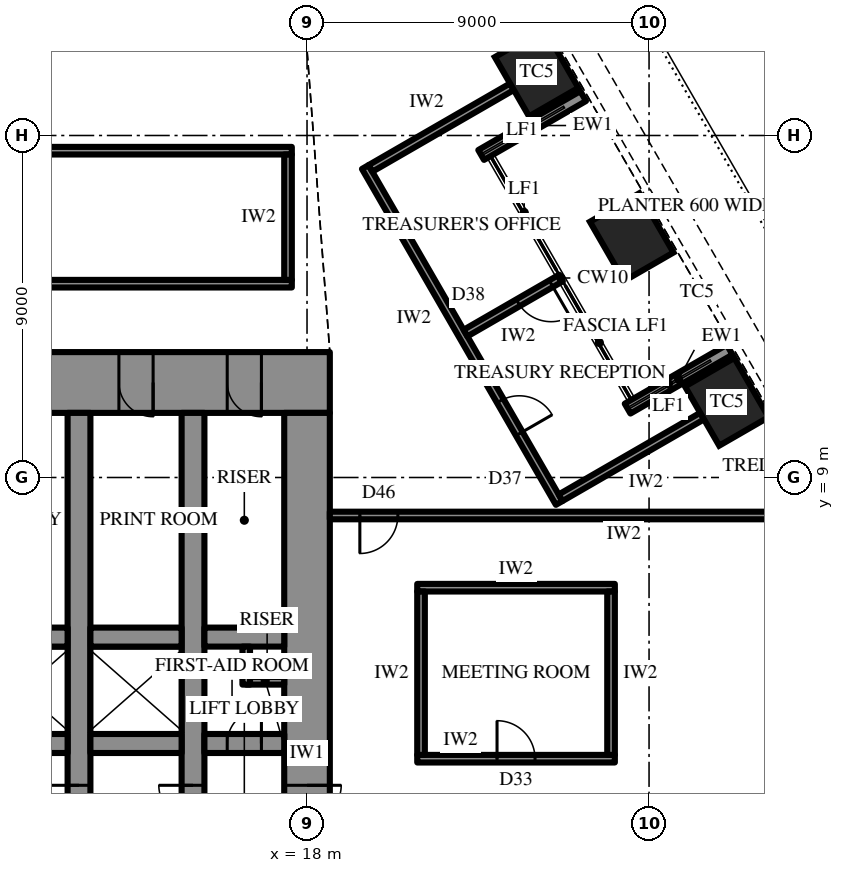
"""IFC4 building model, lengths in metres.
Left out: names, types, materials, properties, quantities, classifications, styles, units other than length and angle.
Written with IfcOpenShell. Run it as: python <this file> out.ifc"""

import sys

from ifc_helpers import new_model, si_unit, direction, frame, frame_2d, origin, origin_2d, place, context, subcontext, project, spatial, rectangle, extrude, element, fill, save


model = new_model("IFC4")
c1 = context("Model", 3, precision=1e-05, world=origin(), true_north=direction((0.0, 1.0)))
c2 = subcontext(c1, "Body", "Model", "MODEL_VIEW")
j1 = project(units=[si_unit("LENGTHUNIT", "METRE"), si_unit("PLANEANGLEUNIT", "RADIAN")], contexts=[c1])
p1 = place(None, origin())
s1 = spatial("IfcSite", under=j1, at=p1, CompositionType="ELEMENT")
p2 = place(p1, origin())
s2 = spatial("IfcBuilding", under=s1, at=p2, CompositionType="ELEMENT")
p3 = place(p2, frame((0.0, 0.0, 136.3)))
s3 = spatial("IfcBuildingStorey", under=s2, at=p3, CompositionType="ELEMENT", Elevation=136.3)
for number, where, z_axis, x_axis in (
    (1, (29.045, 10.992, 0.0), (0.0, 0.0, 1.0), (-0.5, 0.866, 0.0)),
    (2, (26.544, 15.325, 0.0), (0.0, 0.0, 1.0), (-0.5, 0.866, 0.0)),
    (3, (24.042, 19.658, 0.0), (0.0, 0.0, 1.0), (-0.5, 0.866, 0.0)),
):
    element("IfcColumn", number, at=place(p3, frame(where, z_axis=z_axis, x_axis=x_axis)), inside=s3, PredefinedType="COLUMN", context=c2, shape_type="SweptSolid", body=[
        extrude(rectangle(XDim=1.8, YDim=1.5, at=origin_2d()), origin(), (0.0, 0.0, 1.0), 4.2),
    ])
p4 = place(p3, frame((-18.6, 11.5, 0.0), z_axis=(0.0, 0.0, 1.0), x_axis=(1.0, 0.0, 0.0)))
e4 = element("IfcWall", 4, at=p4, inside=s3, PredefinedType="SHEAR", context=c2, shape_type="SweptSolid", body=[
    extrude(rectangle(XDim=37.2, YDim=1.6, at=frame_2d((18.6, 0.0))), origin(), (0.0, 0.0, 1.0), 4.2),
])
p5 = place(p4, frame((19.45, 0.0, 0.0)))
e5 = element("IfcOpeningElement", 5, at=p5, cuts=e4, PredefinedType="OPENING", context=c2, shape_type="SweptSolid", body=[
    extrude(rectangle(XDim=0.9, YDim=2.2, at=frame_2d((0.45, 1.1))), frame((0.0, 0.81, 0.0), z_axis=(0.0, -1.0, 0.0), x_axis=(1.0, 0.0, 0.0)), (0.0, 0.0, 1.0), 1.62),
])
p6 = place(p4, frame((22.45, 0.0, 0.0)))
e6 = element("IfcOpeningElement", 6, at=p6, cuts=e4, PredefinedType="OPENING", context=c2, shape_type="SweptSolid", body=[
    extrude(rectangle(XDim=0.9, YDim=2.2, at=frame_2d((0.45, 1.1))), frame((0.0, 0.81, 0.0), z_axis=(0.0, -1.0, 0.0), x_axis=(1.0, 0.0, 0.0)), (0.0, 0.0, 1.0), 1.62),
])
p7 = place(p4, frame((25.5, 0.0, 0.0)))
e7 = element("IfcOpeningElement", 7, at=p7, cuts=e4, PredefinedType="OPENING", context=c2, shape_type="SweptSolid", body=[
    extrude(rectangle(XDim=1.0, YDim=2.2, at=frame_2d((0.5, 1.1))), frame((0.0, 0.81, 0.0), z_axis=(0.0, -1.0, 0.0), x_axis=(1.0, 0.0, 0.0)), (0.0, 0.0, 1.0), 1.62),
])
p8 = place(p4, frame((1.8, 0.0, 0.0)))
e8 = element("IfcOpeningElement", 8, at=p8, cuts=e4, PredefinedType="OPENING", context=c2, shape_type="SweptSolid", body=[
    extrude(rectangle(XDim=0.9, YDim=2.2, at=frame_2d((0.45, 1.1))), frame((0.0, 0.81, 0.0), z_axis=(0.0, -1.0, 0.0), x_axis=(1.0, 0.0, 0.0)), (0.0, 0.0, 1.0), 1.62),
])
p9 = place(p4, frame((4.65, 0.0, 0.0)))
e9 = element("IfcOpeningElement", 9, at=p9, cuts=e4, PredefinedType="OPENING", context=c2, shape_type="SweptSolid", body=[
    extrude(rectangle(XDim=0.9, YDim=2.2, at=frame_2d((0.45, 1.1))), frame((0.0, 0.81, 0.0), z_axis=(0.0, -1.0, 0.0), x_axis=(1.0, 0.0, 0.0)), (0.0, 0.0, 1.0), 1.62),
])
p10 = place(p4, frame((7.75, 0.0, 0.0)))
e10 = element("IfcOpeningElement", 10, at=p10, cuts=e4, PredefinedType="OPENING", context=c2, shape_type="SweptSolid", body=[
    extrude(rectangle(XDim=0.9, YDim=2.2, at=frame_2d((0.45, 1.1))), frame((0.0, 0.81, 0.0), z_axis=(0.0, -1.0, 0.0), x_axis=(1.0, 0.0, 0.0)), (0.0, 0.0, 1.0), 1.62),
])
p11 = place(p4, frame((28.55, 0.0, 0.0)))
e11 = element("IfcOpeningElement", 11, at=p11, cuts=e4, PredefinedType="OPENING", context=c2, shape_type="SweptSolid", body=[
    extrude(rectangle(XDim=0.9, YDim=2.2, at=frame_2d((0.45, 1.1))), frame((0.0, 0.81, 0.0), z_axis=(0.0, -1.0, 0.0), x_axis=(1.0, 0.0, 0.0)), (0.0, 0.0, 1.0), 1.62),
])
p12 = place(p4, frame((31.65, 0.0, 0.0)))
e12 = element("IfcOpeningElement", 12, at=p12, cuts=e4, PredefinedType="OPENING", context=c2, shape_type="SweptSolid", body=[
    extrude(rectangle(XDim=0.9, YDim=2.2, at=frame_2d((0.45, 1.1))), frame((0.0, 0.81, 0.0), z_axis=(0.0, -1.0, 0.0), x_axis=(1.0, 0.0, 0.0)), (0.0, 0.0, 1.0), 1.62),
])
p13 = place(p4, frame((34.5, 0.0, 0.0)))
e13 = element("IfcOpeningElement", 13, at=p13, cuts=e4, PredefinedType="OPENING", context=c2, shape_type="SweptSolid", body=[
    extrude(rectangle(XDim=0.9, YDim=2.2, at=frame_2d((0.45, 1.1))), frame((0.0, 0.81, 0.0), z_axis=(0.0, -1.0, 0.0), x_axis=(1.0, 0.0, 0.0)), (0.0, 0.0, 1.0), 1.62),
])
p14 = place(p3, frame((18.0, -10.7, 0.0), z_axis=(0.0, 0.0, 1.0), x_axis=(0.0, 1.0, 0.0)))
e14 = element("IfcWall", 14, at=p14, inside=s3, PredefinedType="SHEAR", context=c2, shape_type="SweptSolid", body=[
    extrude(rectangle(XDim=21.4, YDim=1.2, at=frame_2d((10.7, 0.0))), origin(), (0.0, 0.0, 1.0), 4.2),
])
p15 = place(p14, frame((9.8, 0.0, 0.0)))
e15 = element("IfcOpeningElement", 15, at=p15, cuts=e14, PredefinedType="OPENING", context=c2, shape_type="SweptSolid", body=[
    extrude(rectangle(XDim=1.8, YDim=2.4, at=frame_2d((0.9, 1.2))), frame((0.0, 0.61, 0.0), z_axis=(0.0, -1.0, 0.0), x_axis=(1.0, 0.0, 0.0)), (0.0, 0.0, 1.0), 1.22),
])
p16 = place(p3, frame((12.0, -10.7, 0.0), z_axis=(0.0, 0.0, 1.0), x_axis=(0.0, 1.0, 0.0)))
e16 = element("IfcWall", 16, at=p16, inside=s3, PredefinedType="SHEAR", context=c2, shape_type="SweptSolid", body=[
    extrude(rectangle(XDim=21.4, YDim=0.6, at=frame_2d((10.7, 0.0))), origin(), (0.0, 0.0, 1.0), 4.2),
])
p17 = place(p16, frame((9.8, 0.0, 0.0)))
e17 = element("IfcOpeningElement", 17, at=p17, cuts=e16, PredefinedType="OPENING", context=c2, shape_type="SweptSolid", body=[
    extrude(rectangle(XDim=1.8, YDim=2.4, at=frame_2d((0.9, 1.2))), frame((0.0, 0.31, 0.0), z_axis=(0.0, -1.0, 0.0), x_axis=(1.0, 0.0, 0.0)), (0.0, 0.0, 1.0), 0.62),
])
p18 = place(p3, frame((15.0, -10.7, 0.0), z_axis=(0.0, 0.0, 1.0), x_axis=(0.0, 1.0, 0.0)))
e18 = element("IfcWall", 18, at=p18, inside=s3, PredefinedType="SHEAR", context=c2, shape_type="SweptSolid", body=[
    extrude(rectangle(XDim=21.4, YDim=0.6, at=frame_2d((10.7, 0.0))), origin(), (0.0, 0.0, 1.0), 4.2),
])
p19 = place(p18, frame((9.8, 0.0, 0.0)))
e19 = element("IfcOpeningElement", 19, at=p19, cuts=e18, PredefinedType="OPENING", context=c2, shape_type="SweptSolid", body=[
    extrude(rectangle(XDim=1.8, YDim=2.4, at=frame_2d((0.9, 1.2))), frame((0.0, 0.31, 0.0), z_axis=(0.0, -1.0, 0.0), x_axis=(1.0, 0.0, 0.0)), (0.0, 0.0, 1.0), 0.62),
])
p20 = place(p3, frame((-3.2, 2.0, 0.0), z_axis=(0.0, 0.0, 1.0), x_axis=(1.0, 0.0, 0.0)))
e20 = element("IfcWall", 20, at=p20, inside=s3, PredefinedType="SHEAR", context=c2, shape_type="SweptSolid", body=[
    extrude(rectangle(XDim=14.9, YDim=0.5, at=frame_2d((7.45, 0.0))), origin(), (0.0, 0.0, 1.0), 4.2),
])
p21 = place(p20, frame((1.15, 0.0, 0.0)))
e21 = element("IfcOpeningElement", 21, at=p21, cuts=e20, PredefinedType="OPENING", context=c2, shape_type="SweptSolid", body=[
    extrude(rectangle(XDim=1.1, YDim=2.2, at=frame_2d((0.55, 1.1))), frame((0.0, 0.26, 0.0), z_axis=(0.0, -1.0, 0.0), x_axis=(1.0, 0.0, 0.0)), (0.0, 0.0, 1.0), 0.52),
])
p22 = place(p20, frame((4.15, 0.0, 0.0)))
e22 = element("IfcOpeningElement", 22, at=p22, cuts=e20, PredefinedType="OPENING", context=c2, shape_type="SweptSolid", body=[
    extrude(rectangle(XDim=1.1, YDim=2.2, at=frame_2d((0.55, 1.1))), frame((0.0, 0.26, 0.0), z_axis=(0.0, -1.0, 0.0), x_axis=(1.0, 0.0, 0.0)), (0.0, 0.0, 1.0), 0.52),
])
p23 = place(p20, frame((7.15, 0.0, 0.0)))
e23 = element("IfcOpeningElement", 23, at=p23, cuts=e20, PredefinedType="OPENING", context=c2, shape_type="SweptSolid", body=[
    extrude(rectangle(XDim=1.1, YDim=2.2, at=frame_2d((0.55, 1.1))), frame((0.0, 0.26, 0.0), z_axis=(0.0, -1.0, 0.0), x_axis=(1.0, 0.0, 0.0)), (0.0, 0.0, 1.0), 0.52),
])
p24 = place(p20, frame((10.15, 0.0, 0.0)))
e24 = element("IfcOpeningElement", 24, at=p24, cuts=e20, PredefinedType="OPENING", context=c2, shape_type="SweptSolid", body=[
    extrude(rectangle(XDim=1.1, YDim=2.2, at=frame_2d((0.55, 1.1))), frame((0.0, 0.26, 0.0), z_axis=(0.0, -1.0, 0.0), x_axis=(1.0, 0.0, 0.0)), (0.0, 0.0, 1.0), 0.52),
])
p25 = place(p3, frame((12.3, 2.0, 0.0), z_axis=(0.0, 0.0, 1.0), x_axis=(1.0, 0.0, 0.0)))
e25 = element("IfcWall", 25, at=p25, inside=s3, PredefinedType="SHEAR", context=c2, shape_type="SweptSolid", body=[
    extrude(rectangle(XDim=2.4, YDim=0.5, at=frame_2d((1.2, 0.0))), origin(), (0.0, 0.0, 1.0), 4.2),
])
p26 = place(p3, frame((15.3, 2.0, 0.0), z_axis=(0.0, 0.0, 1.0), x_axis=(1.0, 0.0, 0.0)))
e26 = element("IfcWall", 26, at=p26, inside=s3, PredefinedType="SHEAR", context=c2, shape_type="SweptSolid", body=[
    extrude(rectangle(XDim=2.1, YDim=0.5, at=frame_2d((1.05, 0.0))), origin(), (0.0, 0.0, 1.0), 4.2),
])
p27 = place(p26, frame((0.6, 0.0, 0.0)))
e27 = element("IfcOpeningElement", 27, at=p27, cuts=e26, PredefinedType="OPENING", context=c2, shape_type="SweptSolid", body=[
    extrude(rectangle(XDim=0.9, YDim=2.2, at=frame_2d((0.45, 1.1))), frame((0.0, 0.26, 0.0), z_axis=(0.0, -1.0, 0.0), x_axis=(1.0, 0.0, 0.0)), (0.0, 0.0, 1.0), 0.52),
])
p28 = place(p3, frame((-11.7, 4.8, 0.0), z_axis=(0.0, 0.0, 1.0), x_axis=(1.0, 0.0, 0.0)))
e28 = element("IfcWall", 28, at=p28, inside=s3, PredefinedType="SHEAR", context=c2, shape_type="SweptSolid", body=[
    extrude(rectangle(XDim=23.4, YDim=0.5, at=frame_2d((11.7, 0.0))), origin(), (0.0, 0.0, 1.0), 4.2),
])
p29 = place(p28, frame((6.6, 0.0, 0.0)))
e29 = element("IfcOpeningElement", 29, at=p29, cuts=e28, PredefinedType="OPENING", context=c2, shape_type="SweptSolid", body=[
    extrude(rectangle(XDim=1.2, YDim=2.2, at=frame_2d((0.6, 1.1))), frame((0.0, 0.26, 0.0), z_axis=(0.0, -1.0, 0.0), x_axis=(1.0, 0.0, 0.0)), (0.0, 0.0, 1.0), 0.52),
])
p30 = place(p28, frame((3.6, 0.0, 0.0)))
e30 = element("IfcOpeningElement", 30, at=p30, cuts=e28, PredefinedType="OPENING", context=c2, shape_type="SweptSolid", body=[
    extrude(rectangle(XDim=1.2, YDim=2.2, at=frame_2d((0.6, 1.1))), frame((0.0, 0.26, 0.0), z_axis=(0.0, -1.0, 0.0), x_axis=(1.0, 0.0, 0.0)), (0.0, 0.0, 1.0), 0.52),
])
p31 = place(p3, frame((12.3, 4.8, 0.0), z_axis=(0.0, 0.0, 1.0), x_axis=(1.0, 0.0, 0.0)))
e31 = element("IfcWall", 31, at=p31, inside=s3, PredefinedType="SHEAR", context=c2, shape_type="SweptSolid", body=[
    extrude(rectangle(XDim=2.4, YDim=0.5, at=frame_2d((1.2, 0.0))), origin(), (0.0, 0.0, 1.0), 4.2),
])
p32 = place(p3, frame((15.3, 4.8, 0.0), z_axis=(0.0, 0.0, 1.0), x_axis=(1.0, 0.0, 0.0)))
e32 = element("IfcWall", 32, at=p32, inside=s3, PredefinedType="SHEAR", context=c2, shape_type="SweptSolid", body=[
    extrude(rectangle(XDim=2.1, YDim=0.5, at=frame_2d((1.05, 0.0))), origin(), (0.0, 0.0, 1.0), 4.2),
])
p33 = place(p3, frame((29.12, 12.363, 0.0), z_axis=(0.0, 0.0, 1.0), x_axis=(-0.86602952684, -0.49999285859, 0.0)))
e33 = element("IfcWall", 33, at=p33, inside=s3, PredefinedType="SOLIDWALL", context=c2, shape_type="SweptSolid", body=[
    extrude(rectangle(XDim=3.1, YDim=0.3, at=frame_2d((1.55, 0.0))), origin(), (0.0, 0.0, 1.0), 2.75),
])
p34 = place(p3, frame((25.266, 19.037, 0.0), z_axis=(0.0, 0.0, 1.0), x_axis=(-0.86600983753, -0.500026960575, 0.0)))
e34 = element("IfcWall", 34, at=p34, inside=s3, PredefinedType="SOLIDWALL", context=c2, shape_type="SweptSolid", body=[
    extrude(rectangle(XDim=3.1, YDim=0.3, at=frame_2d((1.55, 0.0))), origin(), (0.0, 0.0, 1.0), 2.75),
])
for number, where, z_axis, x_axis in (
    (35, (16.4, 3.65, 0.0), (0.0, 0.0, 1.0), (1.0, 0.0, 0.0)),
    (36, (16.4, 3.55, 0.0), (0.0, 0.0, 1.0), (0.0, 1.0, 0.0)),
):
    element("IfcWall", number, at=place(p3, frame(where, z_axis=z_axis, x_axis=x_axis)), inside=s3, PredefinedType="PARTITIONING", context=c2, shape_type="SweptSolid", body=[
        extrude(rectangle(XDim=1.0, YDim=0.2, at=frame_2d((0.5, 0.0))), origin(), (0.0, 0.0, 1.0), 4.0),
    ])
p35 = place(p3, frame((-17.6, 14.1, 0.0), z_axis=(0.0, 0.0, 1.0), x_axis=(1.0, 0.0, 0.0)))
e37 = element("IfcWall", 37, at=p35, inside=s3, PredefinedType="PARTITIONING", context=c2, shape_type="SweptSolid", body=[
    extrude(rectangle(XDim=35.2, YDim=0.2, at=frame_2d((17.6, 0.0))), origin(), (0.0, 0.0, 1.0), 4.0),
])
p36 = place(p3, frame((-17.6, 17.6, 0.0), z_axis=(0.0, 0.0, 1.0), x_axis=(1.0, 0.0, 0.0)))
e38 = element("IfcWall", 38, at=p36, inside=s3, PredefinedType="PARTITIONING", context=c2, shape_type="SweptSolid", body=[
    extrude(rectangle(XDim=35.2, YDim=0.2, at=frame_2d((17.6, 0.0))), origin(), (0.0, 0.0, 1.0), 4.0),
])
p37 = place(p36, frame((6.2, 0.0, 0.0)))
e39 = element("IfcOpeningElement", 39, at=p37, cuts=e38, PredefinedType="OPENING", context=c2, shape_type="SweptSolid", body=[
    extrude(rectangle(XDim=1.8, YDim=2.4, at=frame_2d((0.9, 1.2))), frame((0.0, 0.11, 0.0), z_axis=(0.0, -1.0, 0.0), x_axis=(1.0, 0.0, 0.0)), (0.0, 0.0, 1.0), 0.22),
])
p38 = place(p36, frame((23.7, 0.0, 0.0)))
e40 = element("IfcOpeningElement", 40, at=p38, cuts=e38, PredefinedType="OPENING", context=c2, shape_type="SweptSolid", body=[
    extrude(rectangle(XDim=1.8, YDim=2.4, at=frame_2d((0.9, 1.2))), frame((0.0, 0.11, 0.0), z_axis=(0.0, -1.0, 0.0), x_axis=(1.0, 0.0, 0.0)), (0.0, 0.0, 1.0), 0.22),
])
p39 = place(p3, frame((17.5, 14.2, 0.0), z_axis=(0.0, 0.0, 1.0), x_axis=(0.0, 1.0, 0.0)))
e41 = element("IfcWall", 41, at=p39, inside=s3, PredefinedType="PARTITIONING", context=c2, shape_type="SweptSolid", body=[
    extrude(rectangle(XDim=3.3, YDim=0.2, at=frame_2d((1.65, 0.0))), origin(), (0.0, 0.0, 1.0), 4.0),
])
p40 = place(p3, frame((24.635, 8.33, 0.0), z_axis=(0.0, 0.0, 1.0), x_axis=(-0.500005407604, 0.86602228168, 0.0)))
e42 = element("IfcWall", 42, at=p40, inside=s3, PredefinedType="PARTITIONING", context=c2, shape_type="SweptSolid", body=[
    extrude(rectangle(XDim=10.208, YDim=0.2, at=frame_2d((5.104, 0.0))), origin(), (0.0, 0.0, 1.0), 4.0),
])
p41 = place(p40, frame((2.102, 0.0, 0.0)))
e43 = element("IfcOpeningElement", 43, at=p41, cuts=e42, PredefinedType="OPENING", context=c2, shape_type="SweptSolid", body=[
    extrude(rectangle(XDim=1.0, YDim=2.2, at=frame_2d((0.5, 1.1))), frame((0.0, 0.11, 0.0), z_axis=(0.0, -1.0, 0.0), x_axis=(1.0, 0.0, 0.0)), (0.0, 0.0, 1.0), 0.22),
])
p42 = place(p3, frame((24.672, 8.467, 0.0), z_axis=(0.0, 0.0, 1.0), x_axis=(0.866008775485, 0.500028799954, 0.0)))
e44 = element("IfcWall", 44, at=p42, inside=s3, PredefinedType="PARTITIONING", context=c2, shape_type="SweptSolid", body=[
    extrude(rectangle(XDim=4.3, YDim=0.2, at=frame_2d((2.15, 0.0))), origin(), (0.0, 0.0, 1.0), 3.082),
])
p43 = place(p3, frame((22.17, 12.8, 0.0), z_axis=(0.0, 0.0, 1.0), x_axis=(0.866044046824, 0.499967707918, 0.0)))
e45 = element("IfcWall", 45, at=p43, inside=s3, PredefinedType="PARTITIONING", context=c2, shape_type="SweptSolid", body=[
    extrude(rectangle(XDim=2.901, YDim=0.2, at=frame_2d((1.451, 0.0))), origin(), (0.0, 0.0, 1.0), 4.0),
])
p44 = place(p43, frame((1.6, 0.0, 0.0)))
e46 = element("IfcOpeningElement", 46, at=p44, cuts=e45, PredefinedType="OPENING", context=c2, shape_type="SweptSolid", body=[
    extrude(rectangle(XDim=1.0, YDim=2.2, at=frame_2d((0.5, 1.1))), frame((0.0, 0.11, 0.0), z_axis=(0.0, -1.0, 0.0), x_axis=(1.0, 0.0, 0.0)), (0.0, 0.0, 1.0), 0.22),
])
p45 = place(p3, frame((19.668, 17.133, 0.0), z_axis=(0.0, 0.0, 1.0), x_axis=(0.866008775485, 0.500028799954, 0.0)))
e47 = element("IfcWall", 47, at=p45, inside=s3, PredefinedType="PARTITIONING", context=c2, shape_type="SweptSolid", body=[
    extrude(rectangle(XDim=4.3, YDim=0.2, at=frame_2d((2.15, 0.0))), origin(), (0.0, 0.0, 1.0), 3.082),
])
p46 = place(p3, frame((20.9, 1.6, 0.0), z_axis=(0.0, 0.0, 1.0), x_axis=(1.0, 0.0, 0.0)))
e48 = element("IfcWall", 48, at=p46, inside=s3, PredefinedType="PARTITIONING", context=c2, shape_type="SweptSolid", body=[
    extrude(rectangle(XDim=5.2, YDim=0.2, at=frame_2d((2.6, 0.0))), origin(), (0.0, 0.0, 1.0), 4.0),
])
p47 = place(p46, frame((2.1, 0.0, 0.0)))
e49 = element("IfcOpeningElement", 49, at=p47, cuts=e48, PredefinedType="OPENING", context=c2, shape_type="SweptSolid", body=[
    extrude(rectangle(XDim=1.0, YDim=2.2, at=frame_2d((0.5, 1.1))), frame((0.0, 0.11, 0.0), z_axis=(0.0, -1.0, 0.0), x_axis=(1.0, 0.0, 0.0)), (0.0, 0.0, 1.0), 0.22),
])
p48 = place(p3, frame((20.9, 6.1, 0.0), z_axis=(0.0, 0.0, 1.0), x_axis=(1.0, 0.0, 0.0)))
e50 = element("IfcWall", 50, at=p48, inside=s3, PredefinedType="PARTITIONING", context=c2, shape_type="SweptSolid", body=[
    extrude(rectangle(XDim=5.2, YDim=0.2, at=frame_2d((2.6, 0.0))), origin(), (0.0, 0.0, 1.0), 4.0),
])
for number, where, z_axis, x_axis in (
    (51, (21.0, 1.7, 0.0), (0.0, 0.0, 1.0), (0.0, 1.0, 0.0)),
    (52, (26.0, 1.7, 0.0), (0.0, 0.0, 1.0), (0.0, 1.0, 0.0)),
):
    element("IfcWall", number, at=place(p3, frame(where, z_axis=z_axis, x_axis=x_axis)), inside=s3, PredefinedType="PARTITIONING", context=c2, shape_type="SweptSolid", body=[
        extrude(rectangle(XDim=4.3, YDim=0.2, at=frame_2d((2.15, 0.0))), origin(), (0.0, 0.0, 1.0), 4.0),
    ])
p49 = place(p3, frame((18.6, 8.0, 0.0), z_axis=(0.0, 0.0, 1.0), x_axis=(1.0, 0.0, 0.0)))
e53 = element("IfcWall", 53, at=p49, inside=s3, PredefinedType="PARTITIONING", context=c2, shape_type="SweptSolid", body=[
    extrude(rectangle(XDim=12.9, YDim=0.2, at=frame_2d((6.45, 0.0))), origin(), (0.0, 0.0, 1.0), 4.0),
])
p50 = place(p49, frame((0.79, 0.0, 0.0)))
e54 = element("IfcOpeningElement", 54, at=p50, cuts=e53, PredefinedType="OPENING", context=c2, shape_type="SweptSolid", body=[
    extrude(rectangle(XDim=1.0, YDim=2.2, at=frame_2d((0.5, 1.1))), frame((0.0, 0.11, 0.0), z_axis=(0.0, -1.0, 0.0), x_axis=(1.0, 0.0, 0.0)), (0.0, 0.0, 1.0), 0.22),
])
p51 = place(p15, frame((1.8, 0.0, 0.0), z_axis=(0.0, 0.0, 1.0), x_axis=(-1.0, 0.0, 0.0)))
e55 = element("IfcDoor", 55, at=p51, inside=s3, OperationType="DOUBLE_DOOR_SINGLE_SWING", PredefinedType="DOOR", context=c2, shape_type="SweptSolid", body=[
    extrude(rectangle(XDim=1.8, YDim=2.4, at=frame_2d((0.9, 1.2))), frame((0.0, 0.025, 0.0), z_axis=(0.0, -1.0, 0.0), x_axis=(1.0, 0.0, 0.0)), (0.0, 0.0, 1.0), 0.05),
])
fill(e15, e55)
p52 = place(p12, frame((0.9, 0.0, 0.0), z_axis=(0.0, 0.0, 1.0), x_axis=(-1.0, 0.0, 0.0)))
e56 = element("IfcDoor", 56, at=p52, inside=s3, OperationType="SINGLE_SWING_RIGHT", PredefinedType="DOOR", context=c2, shape_type="SweptSolid", body=[
    extrude(rectangle(XDim=0.9, YDim=2.2, at=frame_2d((0.45, 1.1))), frame((0.0, 0.025, 0.0), z_axis=(0.0, -1.0, 0.0), x_axis=(1.0, 0.0, 0.0)), (0.0, 0.0, 1.0), 0.05),
])
fill(e12, e56)
p53 = place(p13, frame((0.9, 0.0, 0.0), z_axis=(0.0, 0.0, 1.0), x_axis=(-1.0, 0.0, 0.0)))
e57 = element("IfcDoor", 57, at=p53, inside=s3, OperationType="SINGLE_SWING_RIGHT", PredefinedType="DOOR", context=c2, shape_type="SweptSolid", body=[
    extrude(rectangle(XDim=0.9, YDim=2.2, at=frame_2d((0.45, 1.1))), frame((0.0, 0.025, 0.0), z_axis=(0.0, -1.0, 0.0), x_axis=(1.0, 0.0, 0.0)), (0.0, 0.0, 1.0), 0.05),
])
fill(e13, e57)
p54 = place(p27, origin())
e58 = element("IfcDoor", 58, at=p54, inside=s3, OperationType="SINGLE_SWING_LEFT", PredefinedType="DOOR", context=c2, shape_type="SweptSolid", body=[
    extrude(rectangle(XDim=0.9, YDim=2.2, at=frame_2d((0.45, 1.1))), frame((0.0, 0.025, 0.0), z_axis=(0.0, -1.0, 0.0), x_axis=(1.0, 0.0, 0.0)), (0.0, 0.0, 1.0), 0.05),
])
fill(e27, e58)
p55 = place(p17, origin())
e59 = element("IfcDoor", 59, at=p55, inside=s3, OperationType="DOUBLE_DOOR_SINGLE_SWING", PredefinedType="DOOR", context=c2, shape_type="SweptSolid", body=[
    extrude(rectangle(XDim=1.8, YDim=2.4, at=frame_2d((0.9, 1.2))), frame((0.0, 0.025, 0.0), z_axis=(0.0, -1.0, 0.0), x_axis=(1.0, 0.0, 0.0)), (0.0, 0.0, 1.0), 0.05),
])
fill(e17, e59)
p56 = place(p19, origin())
e60 = element("IfcDoor", 60, at=p56, inside=s3, OperationType="DOUBLE_DOOR_SINGLE_SWING", PredefinedType="DOOR", context=c2, shape_type="SweptSolid", body=[
    extrude(rectangle(XDim=1.8, YDim=2.4, at=frame_2d((0.9, 1.2))), frame((0.0, 0.025, 0.0), z_axis=(0.0, -1.0, 0.0), x_axis=(1.0, 0.0, 0.0)), (0.0, 0.0, 1.0), 0.05),
])
fill(e19, e60)
p57 = place(p41, frame((1.0, 0.0, 0.0), z_axis=(0.0, 0.0, 1.0), x_axis=(-1.0, 0.0, 0.0)))
e61 = element("IfcDoor", 61, at=p57, inside=s3, OperationType="SINGLE_SWING_LEFT", PredefinedType="DOOR", context=c2, shape_type="SweptSolid", body=[
    extrude(rectangle(XDim=1.0, YDim=2.2, at=frame_2d((0.5, 1.1))), frame((0.0, 0.025, 0.0), z_axis=(0.0, -1.0, 0.0), x_axis=(1.0, 0.0, 0.0)), (0.0, 0.0, 1.0), 0.05),
])
fill(e43, e61)
p58 = place(p44, frame((1.0, 0.0, 0.0), z_axis=(0.0, 0.0, 1.0), x_axis=(-1.0, 0.0, 0.0)))
e62 = element("IfcDoor", 62, at=p58, inside=s3, OperationType="SINGLE_SWING_RIGHT", PredefinedType="DOOR", context=c2, shape_type="SweptSolid", body=[
    extrude(rectangle(XDim=1.0, YDim=2.2, at=frame_2d((0.5, 1.1))), frame((0.0, 0.025, 0.0), z_axis=(0.0, -1.0, 0.0), x_axis=(1.0, 0.0, 0.0)), (0.0, 0.0, 1.0), 0.05),
])
fill(e46, e62)
p59 = place(p47, origin())
e63 = element("IfcDoor", 63, at=p59, inside=s3, OperationType="SINGLE_SWING_RIGHT", PredefinedType="DOOR", context=c2, shape_type="SweptSolid", body=[
    extrude(rectangle(XDim=1.0, YDim=2.2, at=frame_2d((0.5, 1.1))), frame((0.0, 0.025, 0.0), z_axis=(0.0, -1.0, 0.0), x_axis=(1.0, 0.0, 0.0)), (0.0, 0.0, 1.0), 0.05),
])
fill(e49, e63)
p60 = place(p50, frame((1.0, 0.0, 0.0), z_axis=(0.0, 0.0, 1.0), x_axis=(-1.0, 0.0, 0.0)))
e64 = element("IfcDoor", 64, at=p60, inside=s3, OperationType="SINGLE_SWING_LEFT", PredefinedType="DOOR", context=c2, shape_type="SweptSolid", body=[
    extrude(rectangle(XDim=1.0, YDim=2.2, at=frame_2d((0.5, 1.1))), frame((0.0, 0.025, 0.0), z_axis=(0.0, -1.0, 0.0), x_axis=(1.0, 0.0, 0.0)), (0.0, 0.0, 1.0), 0.05),
])
fill(e54, e64)
save(model, sys.argv[1])
